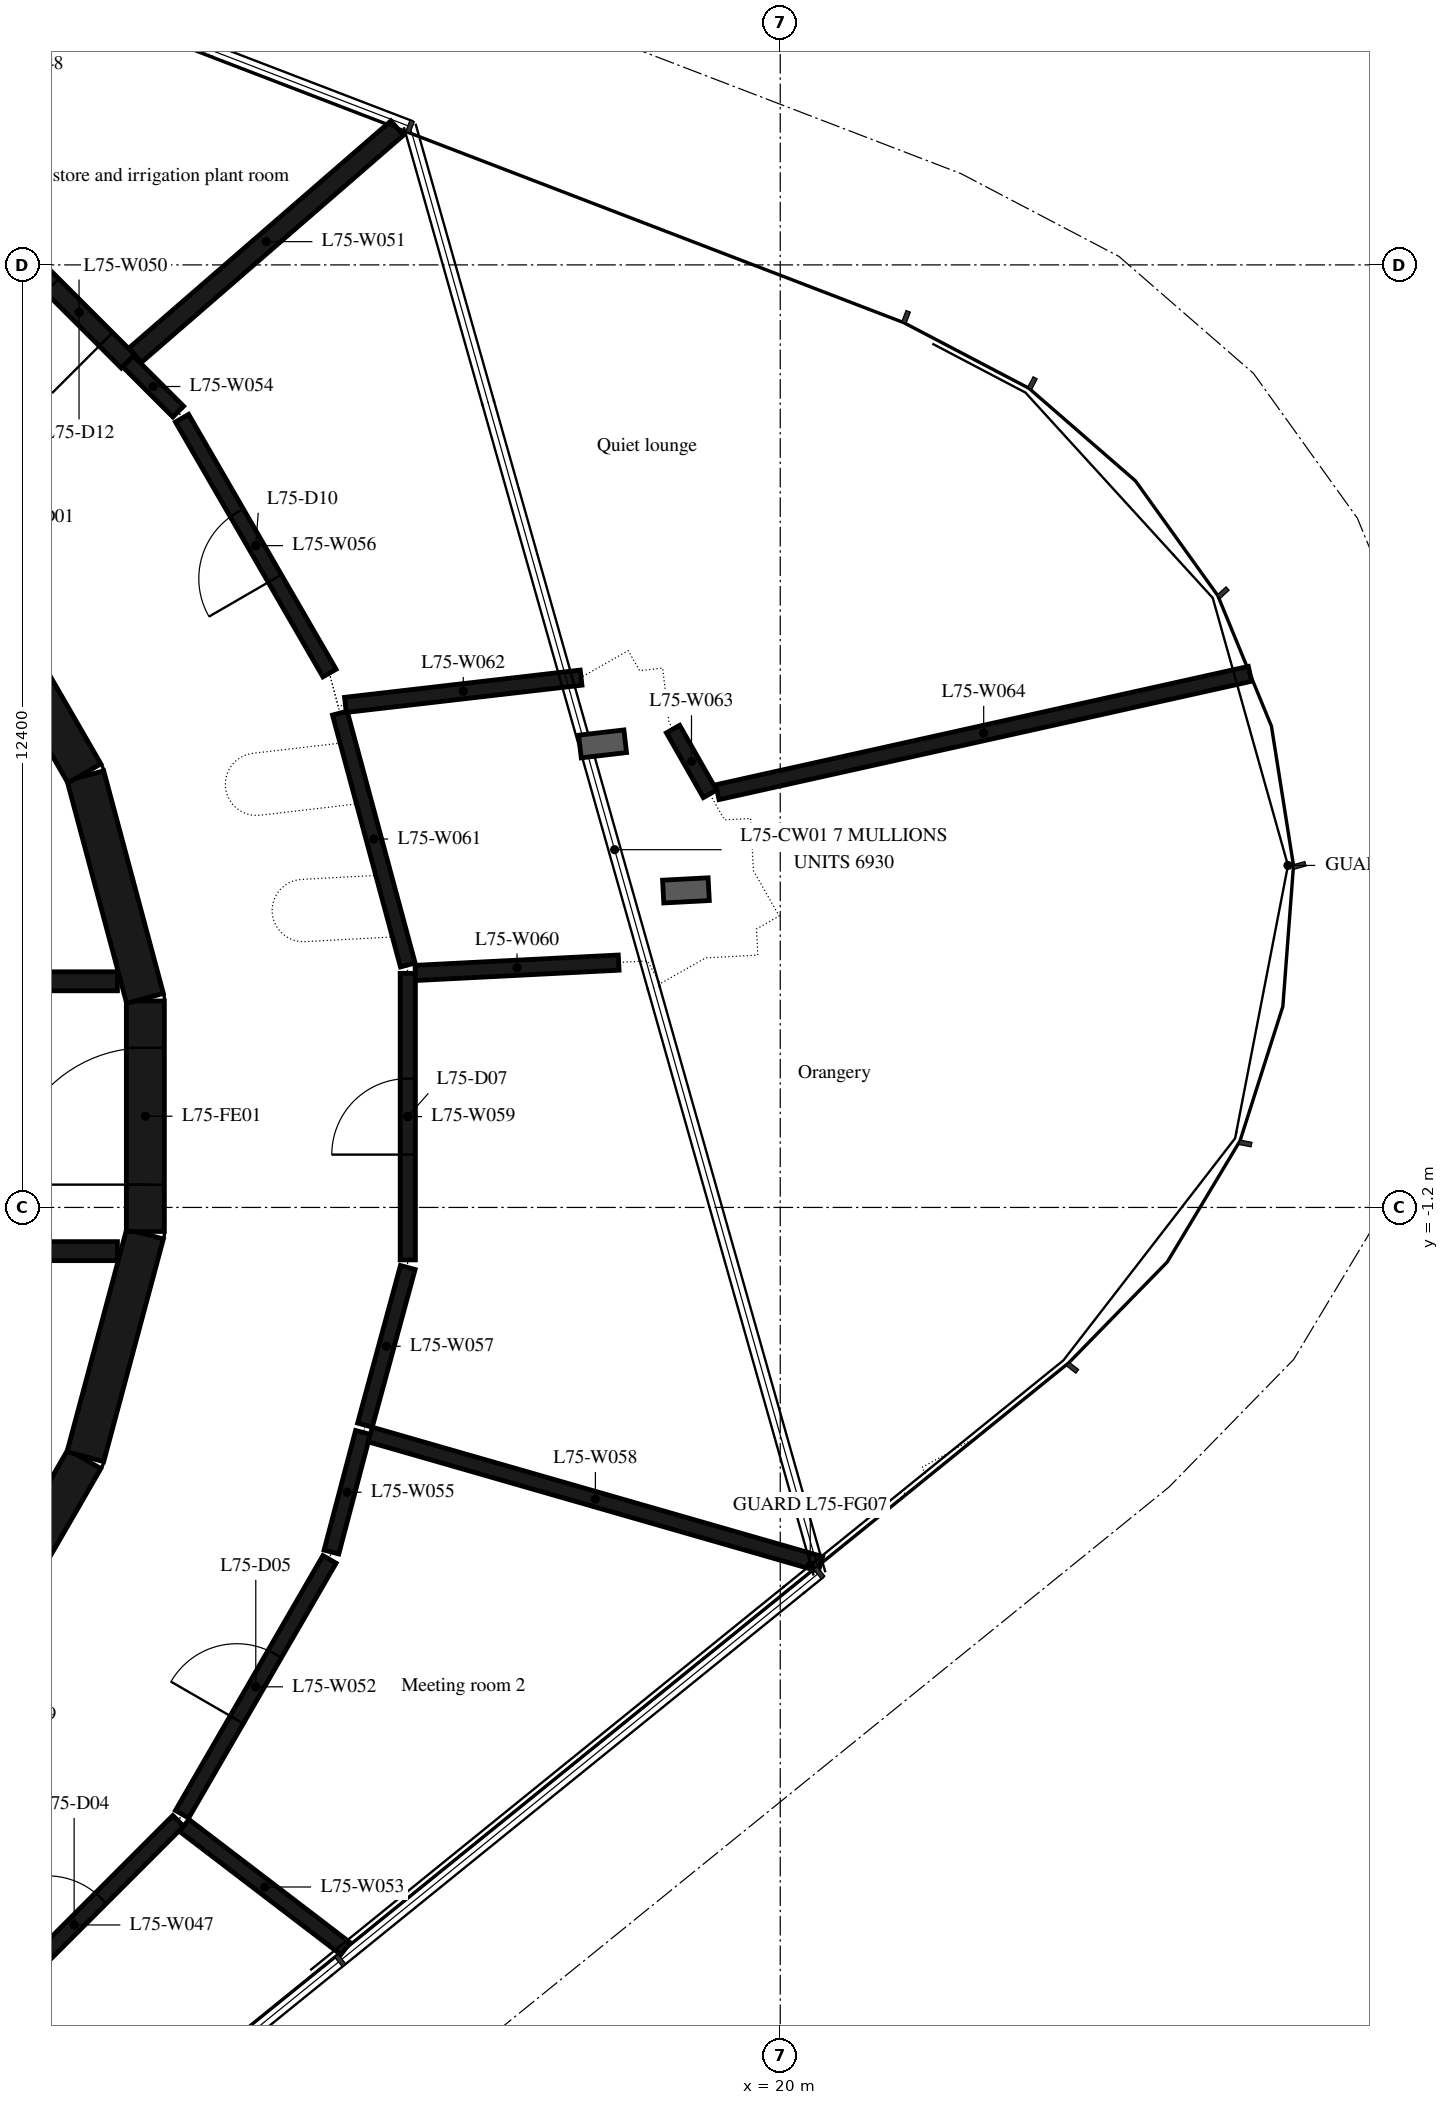
"""IFC4 building model, lengths in metres.
Left out: names, types, materials, properties, quantities, classifications, styles, units other than length and angle.
Written with IfcOpenShell. Run it as: python <this file> out.ifc"""

import sys

from ifc_helpers import new_model, si_unit, direction, frame, frame_2d, origin, place, context, subcontext, project, spatial, rectangle, extrude, element, fill, save


model = new_model("IFC4")
c1 = context("Model", 3, precision=1e-05, world=origin(), true_north=direction((0.0, 1.0)))
c2 = subcontext(c1, "Body", "Model", "MODEL_VIEW")
j1 = project(units=[si_unit("LENGTHUNIT", "METRE"), si_unit("PLANEANGLEUNIT", "RADIAN")], contexts=[c1])
p1 = place(None, origin())
s1 = spatial("IfcSite", under=j1, at=p1, CompositionType="ELEMENT")
p2 = place(p1, origin())
s2 = spatial("IfcBuilding", under=s1, at=p2, CompositionType="ELEMENT")
p3 = place(p2, frame((0.0, 0.0, 291.4)))
s3 = spatial("IfcBuildingStorey", under=s2, at=p3, CompositionType="ELEMENT", Elevation=291.4)
for number, where, z_axis, x_axis in (
    (1, (9.329, -7.137, 0.0), (0.0, 0.0, 1.0), (0.5, 0.866, 0.0)),
    (2, (10.858, -4.479, 0.0), (0.0, 0.0, 1.0), (0.259, 0.966, 0.0)),
):
    element("IfcWall", number, at=place(p3, frame(where, z_axis=z_axis, x_axis=x_axis)), inside=s3, PredefinedType="SHEAR", context=c2, shape_type="SweptSolid", body=[
        extrude(rectangle(XDim=3.033, YDim=0.5, at=frame_2d((1.516, 0.0))), origin(), (0.0, 0.0, 1.0), 6.35),
    ])
p4 = place(p3, frame((11.647, -1.516, 0.0), z_axis=(0.0, 0.0, 1.0), x_axis=(0.0, 1.0, 0.0)))
e3 = element("IfcWall", 3, at=p4, inside=s3, PredefinedType="SHEAR", context=c2, shape_type="SweptSolid", body=[
    extrude(rectangle(XDim=3.033, YDim=0.5, at=frame_2d((1.516, 0.0))), origin(), (0.0, 0.0, 1.0), 6.35),
])
p5 = place(p4, frame((0.616, 0.0, 0.0)))
e4 = element("IfcOpeningElement", 4, at=p5, cuts=e3, PredefinedType="OPENING", context=c2, shape_type="SweptSolid", body=[
    extrude(rectangle(XDim=1.8, YDim=2.1, at=frame_2d((0.9, 1.05))), frame((0.0, 0.26, 0.0), z_axis=(0.0, -1.0, 0.0), x_axis=(1.0, 0.0, 0.0)), (0.0, 0.0, 1.0), 0.52),
])
for number, where, z_axis, x_axis in (
    (5, (11.643, 1.55, 0.0), (0.0, 0.0, 1.0), (-0.259, 0.966, 0.0)),
    (6, (10.845, 4.51, 0.0), (0.0, 0.0, 1.0), (-0.5, 0.866, 0.0)),
):
    element("IfcWall", number, at=place(p3, frame(where, z_axis=z_axis, x_axis=x_axis)), inside=s3, PredefinedType="SHEAR", context=c2, shape_type="SweptSolid", body=[
        extrude(rectangle(XDim=3.033, YDim=0.5, at=frame_2d((1.516, 0.0))), origin(), (0.0, 0.0, 1.0), 6.35),
    ])
p6 = place(p3, frame((3.35, 1.775, 0.0), z_axis=(0.0, 0.0, 1.0), x_axis=(1.0, 0.0, 0.0)))
e7 = element("IfcWall", 7, at=p6, inside=s3, PredefinedType="SHEAR", context=c2, shape_type="SweptSolid", body=[
    extrude(rectangle(XDim=7.93, YDim=0.25, at=frame_2d((3.965, 0.0))), origin(), (0.0, 0.0, 1.0), 6.35),
])
p7 = place(p6, frame((0.35, 0.0, 0.0)))
e8 = element("IfcOpeningElement", 8, at=p7, cuts=e7, PredefinedType="OPENING", context=c2, shape_type="SweptSolid", body=[
    extrude(rectangle(XDim=1.2, YDim=2.4, at=frame_2d((0.6, 1.2))), frame((0.0, 0.135, 0.0), z_axis=(0.0, -1.0, 0.0), x_axis=(1.0, 0.0, 0.0)), (0.0, 0.0, 1.0), 0.27),
])
p8 = place(p6, frame((2.5, 0.0, 0.0)))
e9 = element("IfcOpeningElement", 9, at=p8, cuts=e7, PredefinedType="OPENING", context=c2, shape_type="SweptSolid", body=[
    extrude(rectangle(XDim=1.2, YDim=2.4, at=frame_2d((0.6, 1.2))), frame((0.0, 0.135, 0.0), z_axis=(0.0, -1.0, 0.0), x_axis=(1.0, 0.0, 0.0)), (0.0, 0.0, 1.0), 0.27),
])
p9 = place(p6, frame((4.8, 0.0, 0.0)))
e10 = element("IfcOpeningElement", 10, at=p9, cuts=e7, PredefinedType="OPENING", context=c2, shape_type="SweptSolid", body=[
    extrude(rectangle(XDim=0.9, YDim=2.1, at=frame_2d((0.45, 1.05))), frame((0.0, 0.135, 0.0), z_axis=(0.0, -1.0, 0.0), x_axis=(1.0, 0.0, 0.0)), (0.0, 0.0, 1.0), 0.27),
])
p10 = place(p3, frame((3.35, -1.775, 0.0), z_axis=(0.0, 0.0, 1.0), x_axis=(1.0, 0.0, 0.0)))
e11 = element("IfcWall", 11, at=p10, inside=s3, PredefinedType="SHEAR", context=c2, shape_type="SweptSolid", body=[
    extrude(rectangle(XDim=7.93, YDim=0.25, at=frame_2d((3.965, 0.0))), origin(), (0.0, 0.0, 1.0), 6.35),
])
p11 = place(p10, frame((0.4, 0.0, 0.0)))
e12 = element("IfcOpeningElement", 12, at=p11, cuts=e11, PredefinedType="OPENING", context=c2, shape_type="SweptSolid", body=[
    extrude(rectangle(XDim=1.1, YDim=2.4, at=frame_2d((0.55, 1.2))), frame((0.0, 0.135, 0.0), z_axis=(0.0, -1.0, 0.0), x_axis=(1.0, 0.0, 0.0)), (0.0, 0.0, 1.0), 0.27),
])
p12 = place(p10, frame((2.55, 0.0, 0.0)))
e13 = element("IfcOpeningElement", 13, at=p12, cuts=e11, PredefinedType="OPENING", context=c2, shape_type="SweptSolid", body=[
    extrude(rectangle(XDim=1.1, YDim=2.4, at=frame_2d((0.55, 1.2))), frame((0.0, 0.135, 0.0), z_axis=(0.0, -1.0, 0.0), x_axis=(1.0, 0.0, 0.0)), (0.0, 0.0, 1.0), 0.27),
])
p13 = place(p10, frame((4.7, 0.0, 0.0)))
e14 = element("IfcOpeningElement", 14, at=p13, cuts=e11, PredefinedType="OPENING", context=c2, shape_type="SweptSolid", body=[
    extrude(rectangle(XDim=1.1, YDim=2.4, at=frame_2d((0.55, 1.2))), frame((0.0, 0.135, 0.0), z_axis=(0.0, -1.0, 0.0), x_axis=(1.0, 0.0, 0.0)), (0.0, 0.0, 1.0), 0.27),
])
p14 = place(p3, frame((9.341, -12.009, 0.0), z_axis=(0.0, 0.0, 1.0), x_axis=(0.707106781187, 0.707106781187, 0.0)))
e15 = element("IfcWall", 15, at=p14, inside=s3, PredefinedType="PARTITIONING", context=c2, shape_type="SweptSolid", body=[
    extrude(rectangle(XDim=3.874, YDim=0.2, at=frame_2d((1.937, 0.0))), origin(), (0.0, 0.0, 1.0), 6.35),
])
p15 = place(p14, frame((1.437, 0.0, 0.0)))
e16 = element("IfcOpeningElement", 16, at=p15, cuts=e15, PredefinedType="OPENING", context=c2, shape_type="SweptSolid", body=[
    extrude(rectangle(XDim=1.0, YDim=2.1, at=frame_2d((0.5, 1.05))), frame((0.0, 0.11, 0.0), z_axis=(0.0, -1.0, 0.0), x_axis=(1.0, 0.0, 0.0)), (0.0, 0.0, 1.0), 0.22),
])
p16 = place(p3, frame((11.42, 9.93, 0.0), z_axis=(0.0, 0.0, 1.0), x_axis=(-0.707106781187, 0.707106781187, 0.0)))
e17 = element("IfcWall", 17, at=p16, inside=s3, PredefinedType="PARTITIONING", context=c2, shape_type="SweptSolid", body=[
    extrude(rectangle(XDim=1.824, YDim=0.25, at=frame_2d((0.912, 0.0))), origin(), (0.0, 0.0, 1.0), 6.35),
])
p17 = place(p16, frame((0.412, 0.0, 0.0)))
e18 = element("IfcOpeningElement", 18, at=p17, cuts=e17, PredefinedType="OPENING", context=c2, shape_type="SweptSolid", body=[
    extrude(rectangle(XDim=1.0, YDim=2.1, at=frame_2d((0.5, 1.05))), frame((0.0, 0.135, 0.0), z_axis=(0.0, -1.0, 0.0), x_axis=(1.0, 0.0, 0.0)), (0.0, 0.0, 1.0), 0.27),
])
p18 = place(p3, frame((11.514, 10.012, 0.0), z_axis=(0.0, 0.0, 1.0), x_axis=(0.755484160351, 0.655166912671, 0.0)))
e19 = element("IfcWall", 19, at=p18, inside=s3, PredefinedType="PARTITIONING", context=c2, shape_type="SweptSolid", body=[
    extrude(rectangle(XDim=4.561, YDim=0.25, at=frame_2d((2.28, 0.0))), origin(), (0.0, 0.0, 1.0), 6.35),
])
p19 = place(p3, frame((12.13, -9.183, 0.0), z_axis=(0.0, 0.0, 1.0), x_axis=(0.500760497952, 0.865585884642, 0.0)))
e20 = element("IfcWall", 20, at=p19, inside=s3, PredefinedType="PARTITIONING", context=c2, shape_type="SweptSolid", body=[
    extrude(rectangle(XDim=3.874, YDim=0.2, at=frame_2d((1.937, 0.0))), origin(), (0.0, 0.0, 1.0), 6.35),
])
p20 = place(p19, frame((1.437, 0.0, 0.0)))
e21 = element("IfcOpeningElement", 21, at=p20, cuts=e20, PredefinedType="OPENING", context=c2, shape_type="SweptSolid", body=[
    extrude(rectangle(XDim=1.0, YDim=2.1, at=frame_2d((0.5, 1.05))), frame((0.0, 0.11, 0.0), z_axis=(0.0, -1.0, 0.0), x_axis=(1.0, 0.0, 0.0)), (0.0, 0.0, 1.0), 0.22),
])
p21 = place(p3, frame((12.159, -9.331, 0.0), z_axis=(0.0, 0.0, 1.0), x_axis=(0.794809542304, -0.606858955164, 0.0)))
e22 = element("IfcWall", 22, at=p21, inside=s3, PredefinedType="PARTITIONING", context=c2, shape_type="SweptSolid", body=[
    extrude(rectangle(XDim=2.668, YDim=0.2, at=frame_2d((1.334, 0.0))), origin(), (0.0, 0.0, 1.0), 6.35),
])
p22 = place(p3, frame((12.08, 9.27, 0.0), z_axis=(0.0, 0.0, 1.0), x_axis=(-0.707237545267, 0.70697599292, 0.0)))
e23 = element("IfcWall", 23, at=p22, inside=s3, PredefinedType="PARTITIONING", context=c2, shape_type="SweptSolid", body=[
    extrude(rectangle(XDim=0.933, YDim=0.2, at=frame_2d((0.467, 0.0))), origin(), (0.0, 0.0, 1.0), 6.35),
])
p23 = place(p3, frame((14.095, -5.733, 0.0), z_axis=(0.0, 0.0, 1.0), x_axis=(0.254766547026, 0.967002588681, 0.0)))
e24 = element("IfcWall", 24, at=p23, inside=s3, PredefinedType="PARTITIONING", context=c2, shape_type="SweptSolid", body=[
    extrude(rectangle(XDim=1.627, YDim=0.2, at=frame_2d((0.813, 0.0))), origin(), (0.0, 0.0, 1.0), 6.35),
])
p24 = place(p3, frame((14.07, 5.83, 0.0), z_axis=(0.0, 0.0, 1.0), x_axis=(-0.500760497952, 0.865585884642, 0.0)))
e25 = element("IfcWall", 25, at=p24, inside=s3, PredefinedType="PARTITIONING", context=c2, shape_type="SweptSolid", body=[
    extrude(rectangle(XDim=3.874, YDim=0.2, at=frame_2d((1.937, 0.0))), origin(), (0.0, 0.0, 1.0), 6.35),
])
p25 = place(p24, frame((1.437, 0.0, 0.0)))
e26 = element("IfcOpeningElement", 26, at=p25, cuts=e25, PredefinedType="OPENING", context=c2, shape_type="SweptSolid", body=[
    extrude(rectangle(XDim=1.0, YDim=2.1, at=frame_2d((0.5, 1.05))), frame((0.0, 0.11, 0.0), z_axis=(0.0, -1.0, 0.0), x_axis=(1.0, 0.0, 0.0)), (0.0, 0.0, 1.0), 0.22),
])
p26 = place(p3, frame((14.536, -4.063, 0.0), z_axis=(0.0, 0.0, 1.0), x_axis=(0.262453998326, 0.964944505535, 0.0)))
e27 = element("IfcWall", 27, at=p26, inside=s3, PredefinedType="PARTITIONING", context=c2, shape_type="SweptSolid", body=[
    extrude(rectangle(XDim=2.149, YDim=0.2, at=frame_2d((1.074, 0.0))), origin(), (0.0, 0.0, 1.0), 6.35),
])
p27 = place(p3, frame((14.606, -4.188, 0.0), z_axis=(0.0, 0.0, 1.0), x_axis=(0.961099801691, -0.276201323656, 0.0)))
e28 = element("IfcWall", 28, at=p27, inside=s3, PredefinedType="PARTITIONING", context=c2, shape_type="SweptSolid", body=[
    extrude(rectangle(XDim=6.164, YDim=0.2, at=frame_2d((3.082, 0.0))), origin(), (0.0, 0.0, 1.0), 6.35),
])
p28 = place(p3, frame((15.1, -1.89, 0.0), z_axis=(0.0, 0.0, 1.0), x_axis=(0.0, 1.0, 0.0)))
e29 = element("IfcWall", 29, at=p28, inside=s3, PredefinedType="PARTITIONING", context=c2, shape_type="SweptSolid", body=[
    extrude(rectangle(XDim=3.77, YDim=0.2, at=frame_2d((1.885, 0.0))), origin(), (0.0, 0.0, 1.0), 6.35),
])
p29 = place(p28, frame((1.385, 0.0, 0.0)))
e30 = element("IfcOpeningElement", 30, at=p29, cuts=e29, PredefinedType="OPENING", context=c2, shape_type="SweptSolid", body=[
    extrude(rectangle(XDim=1.0, YDim=2.1, at=frame_2d((0.5, 1.05))), frame((0.0, 0.11, 0.0), z_axis=(0.0, -1.0, 0.0), x_axis=(1.0, 0.0, 0.0)), (0.0, 0.0, 1.0), 0.22),
])
p30 = place(p3, frame((15.2, 1.885, 0.0), z_axis=(0.0, 0.0, 1.0), x_axis=(0.998709926097, 0.050778770318, 0.0)))
e31 = element("IfcWall", 31, at=p30, inside=s3, PredefinedType="PARTITIONING", context=c2, shape_type="SweptSolid", body=[
    extrude(rectangle(XDim=2.678, YDim=0.2, at=frame_2d((1.339, 0.0))), origin(), (0.0, 0.0, 1.0), 6.35),
])
p31 = place(p3, frame((15.1, 1.99, 0.0), z_axis=(0.0, 0.0, 1.0), x_axis=(-0.260504067916, 0.965472749796, 0.0)))
e32 = element("IfcWall", 32, at=p31, inside=s3, PredefinedType="PARTITIONING", context=c2, shape_type="SweptSolid", body=[
    extrude(rectangle(XDim=3.432, YDim=0.2, at=frame_2d((1.716, 0.0))), origin(), (0.0, 0.0, 1.0), 6.35),
])
p32 = place(p3, frame((17.38, 5.77, 0.0), z_axis=(0.0, 0.0, 1.0), x_axis=(-0.993376695714, -0.114903178426, 0.0)))
e33 = element("IfcWall", 33, at=p32, inside=s3, PredefinedType="PARTITIONING", context=c2, shape_type="SweptSolid", body=[
    extrude(rectangle(XDim=3.121, YDim=0.2, at=frame_2d((1.561, 0.0))), origin(), (0.0, 0.0, 1.0), 6.35),
])
p33 = place(p3, frame((18.59, 5.093, 0.0), z_axis=(0.0, 0.0, 1.0), x_axis=(0.495441674579, -0.86864120734, 0.0)))
e34 = element("IfcWall", 34, at=p33, inside=s3, PredefinedType="PARTITIONING", context=c2, shape_type="SweptSolid", body=[
    extrude(rectangle(XDim=0.981, YDim=0.2, at=frame_2d((0.49, 0.0))), origin(), (0.0, 0.0, 1.0), 6.35),
])
p34 = place(p3, frame((19.173, 4.263, 0.0), z_axis=(0.0, 0.0, 1.0), x_axis=(0.976185459525, 0.216937660657, 0.0)))
e35 = element("IfcWall", 35, at=p34, inside=s3, PredefinedType="PARTITIONING", context=c2, shape_type="SweptSolid", body=[
    extrude(rectangle(XDim=7.178, YDim=0.2, at=frame_2d((3.589, 0.0))), origin(), (0.0, 0.0, 1.0), 6.35),
])
p35 = place(p5, origin())
e36 = element("IfcDoor", 36, at=p35, inside=s3, OperationType="DOUBLE_DOOR_SINGLE_SWING", PredefinedType="DOOR", context=c2, shape_type="SweptSolid", body=[
    extrude(rectangle(XDim=1.8, YDim=2.1, at=frame_2d((0.9, 1.05))), frame((0.0, 0.025, 0.0), z_axis=(0.0, -1.0, 0.0), x_axis=(1.0, 0.0, 0.0)), (0.0, 0.0, 1.0), 0.05),
])
fill(e4, e36)
p36 = place(p15, origin())
e37 = element("IfcDoor", 37, at=p36, inside=s3, OperationType="SINGLE_SWING_LEFT", PredefinedType="DOOR", context=c2, shape_type="SweptSolid", body=[
    extrude(rectangle(XDim=1.0, YDim=2.1, at=frame_2d((0.5, 1.05))), frame((0.0, 0.025, 0.0), z_axis=(0.0, -1.0, 0.0), x_axis=(1.0, 0.0, 0.0)), (0.0, 0.0, 1.0), 0.05),
])
fill(e16, e37)
p37 = place(p20, origin())
e38 = element("IfcDoor", 38, at=p37, inside=s3, OperationType="SINGLE_SWING_LEFT", PredefinedType="DOOR", context=c2, shape_type="SweptSolid", body=[
    extrude(rectangle(XDim=1.0, YDim=2.1, at=frame_2d((0.5, 1.05))), frame((0.0, 0.025, 0.0), z_axis=(0.0, -1.0, 0.0), x_axis=(1.0, 0.0, 0.0)), (0.0, 0.0, 1.0), 0.05),
])
fill(e21, e38)
p38 = place(p29, origin())
e39 = element("IfcDoor", 39, at=p38, inside=s3, OperationType="SINGLE_SWING_LEFT", PredefinedType="DOOR", context=c2, shape_type="SweptSolid", body=[
    extrude(rectangle(XDim=1.0, YDim=2.1, at=frame_2d((0.5, 1.05))), frame((0.0, 0.025, 0.0), z_axis=(0.0, -1.0, 0.0), x_axis=(1.0, 0.0, 0.0)), (0.0, 0.0, 1.0), 0.05),
])
fill(e30, e39)
p39 = place(p25, origin())
e40 = element("IfcDoor", 40, at=p39, inside=s3, OperationType="SINGLE_SWING_LEFT", PredefinedType="DOOR", context=c2, shape_type="SweptSolid", body=[
    extrude(rectangle(XDim=1.0, YDim=2.1, at=frame_2d((0.5, 1.05))), frame((0.0, 0.025, 0.0), z_axis=(0.0, -1.0, 0.0), x_axis=(1.0, 0.0, 0.0)), (0.0, 0.0, 1.0), 0.05),
])
fill(e26, e40)
p40 = place(p17, origin())
e41 = element("IfcDoor", 41, at=p40, inside=s3, OperationType="SINGLE_SWING_LEFT", PredefinedType="DOOR", context=c2, shape_type="SweptSolid", body=[
    extrude(rectangle(XDim=1.0, YDim=2.1, at=frame_2d((0.5, 1.05))), frame((0.0, 0.025, 0.0), z_axis=(0.0, -1.0, 0.0), x_axis=(1.0, 0.0, 0.0)), (0.0, 0.0, 1.0), 0.05),
])
fill(e18, e41)
save(model, sys.argv[1])
